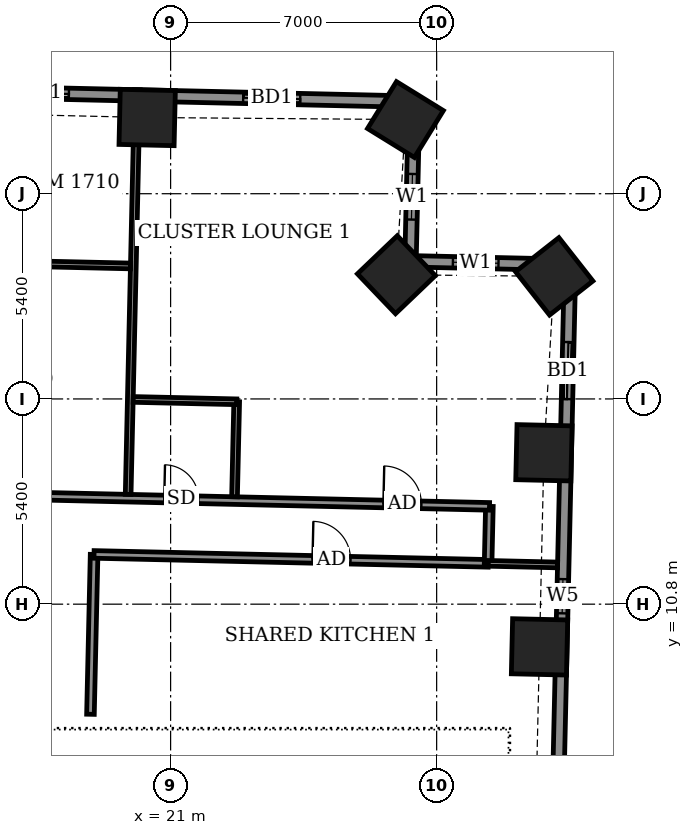
"""IFC4 building model, lengths in metres.
Left out: names, types, materials, properties, quantities, classifications, styles, units other than length and angle.
Written with IfcOpenShell. Run it as: python <this file> out.ifc"""

import sys

from ifc_helpers import new_model, si_unit, direction, frame, frame_2d, origin, origin_2d, place, context, subcontext, project, spatial, rectangle, extrude, element, fill, save


model = new_model("IFC4")
c1 = context("Model", 3, precision=1e-05, world=origin(), true_north=direction((0.0, 1.0)))
c2 = subcontext(c1, "Body", "Model", "MODEL_VIEW")
j1 = project(units=[si_unit("LENGTHUNIT", "METRE"), si_unit("PLANEANGLEUNIT", "RADIAN")], contexts=[c1])
p1 = place(None, origin())
s1 = spatial("IfcSite", under=j1, at=p1, CompositionType="ELEMENT")
p2 = place(p1, origin())
s2 = spatial("IfcBuilding", under=s1, at=p2, CompositionType="ELEMENT")
p3 = place(p2, frame((0.0, 0.0, 71.1)))
s3 = spatial("IfcBuildingStorey", under=s2, at=p3, CompositionType="ELEMENT", Elevation=71.1)
for number, where, z_axis, x_axis in (
    (1, (30.707, 9.677, -0.55), (0.0, 0.0, 1.0), (0.023, 1.0, 0.0)),
    (2, (30.823, 14.783, -0.55), (0.0, 0.0, 1.0), (0.023, 1.0, 0.0)),
    (3, (31.094, 19.425, -0.55), (0.0, 0.0, 1.0), (-0.617, 0.787, 0.0)),
    (4, (26.941, 19.468, -0.55), (0.0, 0.0, 1.0), (-0.691, 0.723, 0.0)),
    (5, (27.179, 23.551, -0.55), (0.0, 0.0, 1.0), (-0.851, 0.525, 0.0)),
    (6, (20.384, 23.605, -0.55), (0.0, 0.0, 1.0), (-1.0, 0.023, 0.0)),
):
    element("IfcColumn", number, at=place(p3, frame(where, z_axis=z_axis, x_axis=x_axis)), inside=s3, PredefinedType="COLUMN", context=c2, shape_type="SweptSolid", body=[
        extrude(rectangle(XDim=1.45, YDim=1.45, at=origin_2d()), origin(), (0.0, 0.0, 1.0), 3.6),
    ])
p4 = place(p3, frame((31.165, 4.502, 0.0), z_axis=(0.0, 0.0, 1.0), x_axis=(0.022716307128, 0.999741951401, 0.0)))
e7 = element("IfcWall", 7, at=p4, inside=s3, PredefinedType="SOLIDWALL", context=c2, shape_type="SweptSolid", body=[
    extrude(rectangle(XDim=15.229, YDim=0.3, at=frame_2d((7.615, 0.0))), origin(), (0.0, 0.0, 1.0), 3.05),
])
p5 = place(p4, frame((6.059, 0.0, 0.9)))
e8 = element("IfcOpeningElement", 8, at=p5, cuts=e7, PredefinedType="OPENING", context=c2, shape_type="SweptSolid", body=[
    extrude(rectangle(XDim=0.9, YDim=1.5, at=frame_2d((0.45, 0.75))), frame((0.0, 0.16, 0.0), z_axis=(0.0, -1.0, 0.0), x_axis=(1.0, 0.0, 0.0)), (0.0, 0.0, 1.0), 0.32),
])
p6 = place(p4, frame((11.697, 0.0, 0.0)))
e9 = element("IfcOpeningElement", 9, at=p6, cuts=e7, PredefinedType="OPENING", context=c2, shape_type="SweptSolid", body=[
    extrude(rectangle(XDim=1.5, YDim=2.4, at=frame_2d((0.75, 1.2))), frame((0.0, 0.16, 0.0), z_axis=(0.0, -1.0, 0.0), x_axis=(1.0, 0.0, 0.0)), (0.0, 0.0, 1.0), 0.32),
])
p7 = place(p3, frame((31.511, 19.727, 0.0), z_axis=(0.0, 0.0, 1.0), x_axis=(-0.999744320311, 0.022611811187, 0.0)))
e10 = element("IfcWall", 10, at=p7, inside=s3, PredefinedType="SOLIDWALL", context=c2, shape_type="SweptSolid", body=[
    extrude(rectangle(XDim=4.2, YDim=0.3, at=frame_2d((2.1, 0.0))), origin(), (0.0, 0.0, 1.0), 2.55),
])
p8 = place(p7, frame((1.884, 0.0, 0.9)))
e11 = element("IfcOpeningElement", 11, at=p8, cuts=e10, PredefinedType="OPENING", context=c2, shape_type="SweptSolid", body=[
    extrude(rectangle(XDim=1.2, YDim=1.5, at=frame_2d((0.6, 0.75))), frame((0.0, 0.16, 0.0), z_axis=(0.0, -1.0, 0.0), x_axis=(1.0, 0.0, 0.0)), (0.0, 0.0, 1.0), 0.32),
])
p9 = place(p3, frame((27.312, 19.822, 0.0), z_axis=(0.0, 0.0, 1.0), x_axis=(0.022611811187, 0.999744320311, 0.0)))
e12 = element("IfcWall", 12, at=p9, inside=s3, PredefinedType="SOLIDWALL", context=c2, shape_type="SweptSolid", body=[
    extrude(rectangle(XDim=4.2, YDim=0.3, at=frame_2d((2.1, 0.0))), origin(), (0.0, 0.0, 1.0), 2.55),
])
p10 = place(p9, frame((1.098, 0.0, 0.9)))
e13 = element("IfcOpeningElement", 13, at=p10, cuts=e12, PredefinedType="OPENING", context=c2, shape_type="SweptSolid", body=[
    extrude(rectangle(XDim=1.2, YDim=1.5, at=frame_2d((0.6, 0.75))), frame((0.0, 0.16, 0.0), z_axis=(0.0, -1.0, 0.0), x_axis=(1.0, 0.0, 0.0)), (0.0, 0.0, 1.0), 0.32),
])
p11 = place(p3, frame((27.407, 24.021, 0.0), z_axis=(0.0, 0.0, 1.0), x_axis=(-0.99974239923, 0.022696589664, 0.0)))
e14 = element("IfcWall", 14, at=p11, inside=s3, PredefinedType="SOLIDWALL", context=c2, shape_type="SweptSolid", body=[
    extrude(rectangle(XDim=49.836, YDim=0.3, at=frame_2d((24.918, 0.0))), origin(), (0.0, 0.0, 1.0), 3.05),
])
p12 = place(p11, frame((2.998, 0.0, 0.0)))
e15 = element("IfcOpeningElement", 15, at=p12, cuts=e14, PredefinedType="OPENING", context=c2, shape_type="SweptSolid", body=[
    extrude(rectangle(XDim=1.5, YDim=2.4, at=frame_2d((0.75, 1.2))), frame((0.0, 0.16, 0.0), z_axis=(0.0, -1.0, 0.0), x_axis=(1.0, 0.0, 0.0)), (0.0, 0.0, 1.0), 0.32),
])
p13 = place(p11, frame((9.086, 0.0, 0.0)))
e16 = element("IfcOpeningElement", 16, at=p13, cuts=e14, PredefinedType="OPENING", context=c2, shape_type="SweptSolid", body=[
    extrude(rectangle(XDim=1.5, YDim=2.4, at=frame_2d((0.75, 1.2))), frame((0.0, 0.16, 0.0), z_axis=(0.0, -1.0, 0.0), x_axis=(1.0, 0.0, 0.0)), (0.0, 0.0, 1.0), 0.32),
])
p14 = place(p11, frame((15.017, 0.0, 0.0)))
e17 = element("IfcOpeningElement", 17, at=p14, cuts=e14, PredefinedType="OPENING", context=c2, shape_type="SweptSolid", body=[
    extrude(rectangle(XDim=1.5, YDim=2.4, at=frame_2d((0.75, 1.2))), frame((0.0, 0.16, 0.0), z_axis=(0.0, -1.0, 0.0), x_axis=(1.0, 0.0, 0.0)), (0.0, 0.0, 1.0), 0.32),
])
p15 = place(p11, frame((18.124, 0.0, 0.0)))
e18 = element("IfcOpeningElement", 18, at=p15, cuts=e14, PredefinedType="OPENING", context=c2, shape_type="SweptSolid", body=[
    extrude(rectangle(XDim=1.5, YDim=2.4, at=frame_2d((0.75, 1.2))), frame((0.0, 0.16, 0.0), z_axis=(0.0, -1.0, 0.0), x_axis=(1.0, 0.0, 0.0)), (0.0, 0.0, 1.0), 0.32),
])
p16 = place(p11, frame((23.149, 0.0, 0.0)))
e19 = element("IfcOpeningElement", 19, at=p16, cuts=e14, PredefinedType="OPENING", context=c2, shape_type="SweptSolid", body=[
    extrude(rectangle(XDim=1.5, YDim=2.4, at=frame_2d((0.75, 1.2))), frame((0.0, 0.16, 0.0), z_axis=(0.0, -1.0, 0.0), x_axis=(1.0, 0.0, 0.0)), (0.0, 0.0, 1.0), 0.32),
])
p17 = place(p11, frame((26.405, 0.0, 0.0)))
e20 = element("IfcOpeningElement", 20, at=p17, cuts=e14, PredefinedType="OPENING", context=c2, shape_type="SweptSolid", body=[
    extrude(rectangle(XDim=1.2, YDim=2.4, at=frame_2d((0.6, 1.2))), frame((0.0, 0.16, 0.0), z_axis=(0.0, -1.0, 0.0), x_axis=(1.0, 0.0, 0.0)), (0.0, 0.0, 1.0), 0.32),
])
p18 = place(p11, frame((31.986, 0.0, 0.0)))
e21 = element("IfcOpeningElement", 21, at=p18, cuts=e14, PredefinedType="OPENING", context=c2, shape_type="SweptSolid", body=[
    extrude(rectangle(XDim=1.5, YDim=2.4, at=frame_2d((0.75, 1.2))), frame((0.0, 0.16, 0.0), z_axis=(0.0, -1.0, 0.0), x_axis=(1.0, 0.0, 0.0)), (0.0, 0.0, 1.0), 0.32),
])
p19 = place(p11, frame((37.211, 0.0, 0.0)))
e22 = element("IfcOpeningElement", 22, at=p19, cuts=e14, PredefinedType="OPENING", context=c2, shape_type="SweptSolid", body=[
    extrude(rectangle(XDim=1.5, YDim=2.4, at=frame_2d((0.75, 1.2))), frame((0.0, 0.16, 0.0), z_axis=(0.0, -1.0, 0.0), x_axis=(1.0, 0.0, 0.0)), (0.0, 0.0, 1.0), 0.32),
])
p20 = place(p11, frame((40.317, 0.0, 0.0)))
e23 = element("IfcOpeningElement", 23, at=p20, cuts=e14, PredefinedType="OPENING", context=c2, shape_type="SweptSolid", body=[
    extrude(rectangle(XDim=1.5, YDim=2.4, at=frame_2d((0.75, 1.2))), frame((0.0, 0.16, 0.0), z_axis=(0.0, -1.0, 0.0), x_axis=(1.0, 0.0, 0.0)), (0.0, 0.0, 1.0), 0.32),
])
p21 = place(p11, frame((45.431, 0.0, 0.9)))
e24 = element("IfcOpeningElement", 24, at=p21, cuts=e14, PredefinedType="OPENING", context=c2, shape_type="SweptSolid", body=[
    extrude(rectangle(XDim=2.4, YDim=1.5, at=frame_2d((1.2, 0.75))), frame((0.0, 0.16, 0.0), z_axis=(0.0, -1.0, 0.0), x_axis=(1.0, 0.0, 0.0)), (0.0, 0.0, 1.0), 0.32),
])
p22 = place(p3, frame((18.891, 7.903, 0.0), z_axis=(0.0, 0.0, 1.0), x_axis=(0.022807092041, 0.999739884446, 0.0)))
e25 = element("IfcWall", 25, at=p22, inside=s3, PredefinedType="PARTITIONING", context=c2, shape_type="SweptSolid", body=[
    extrude(rectangle(XDim=4.207, YDim=0.2, at=frame_2d((2.104, 0.0))), origin(), (0.0, 0.0, 1.0), 3.05),
])
p23 = place(p3, frame((18.985, 12.109, 0.0), z_axis=(0.0, 0.0, 1.0), x_axis=(0.999743715221, -0.022638548456, 0.0)))
e26 = element("IfcWall", 26, at=p23, inside=s3, PredefinedType="PARTITIONING", context=c2, shape_type="SweptSolid", body=[
    extrude(rectangle(XDim=10.375, YDim=0.2, at=frame_2d((5.187, 0.0))), origin(), (0.0, 0.0, 1.0), 3.05),
])
p24 = place(p23, frame((5.75, 0.0, 0.0)))
e27 = element("IfcOpeningElement", 27, at=p24, cuts=e26, PredefinedType="OPENING", context=c2, shape_type="SweptSolid", body=[
    extrude(rectangle(XDim=1.0, YDim=2.1, at=frame_2d((0.5, 1.05))), frame((0.0, 0.11, 0.0), z_axis=(0.0, -1.0, 0.0), x_axis=(1.0, 0.0, 0.0)), (0.0, 0.0, 1.0), 0.22),
])
p25 = place(p3, frame((29.354, 11.874, 0.0), z_axis=(0.0, 0.0, 1.0), x_axis=(0.022632637625, 0.99974384905, 0.0)))
e28 = element("IfcWall", 28, at=p25, inside=s3, PredefinedType="PARTITIONING", context=c2, shape_type="SweptSolid", body=[
    extrude(rectangle(XDim=1.5, YDim=0.2, at=frame_2d((0.75, 0.0))), origin(), (0.0, 0.0, 1.0), 3.05),
])
p26 = place(p3, frame((29.357, 11.874, 0.0), z_axis=(0.0, 0.0, 1.0), x_axis=(0.999735374258, -0.023003944398, 0.0)))
e29 = element("IfcWall", 29, at=p26, inside=s3, PredefinedType="PARTITIONING", context=c2, shape_type="SweptSolid", body=[
    extrude(rectangle(XDim=1.825, YDim=0.15, at=frame_2d((0.913, 0.0))), origin(), (0.0, 0.0, 1.0), 2.55),
])
p27 = place(p3, frame((-25.481, 14.619, 0.0), z_axis=(0.0, 0.0, 1.0), x_axis=(0.999742349682, -0.022698772048, 0.0)))
e30 = element("IfcWall", 30, at=p27, inside=s3, PredefinedType="PARTITIONING", context=c2, shape_type="SweptSolid", body=[
    extrude(rectangle(XDim=54.886, YDim=0.2, at=frame_2d((27.443, 0.0))), origin(), (0.0, 0.0, 1.0), 3.05),
])
p28 = place(p27, frame((52.093, 0.0, 0.0)))
e31 = element("IfcOpeningElement", 31, at=p28, cuts=e30, PredefinedType="OPENING", context=c2, shape_type="SweptSolid", body=[
    extrude(rectangle(XDim=1.0, YDim=2.1, at=frame_2d((0.5, 1.05))), frame((0.0, 0.11, 0.0), z_axis=(0.0, -1.0, 0.0), x_axis=(1.0, 0.0, 0.0)), (0.0, 0.0, 1.0), 0.22),
])
p29 = place(p27, frame((46.325, 0.0, 0.0)))
e32 = element("IfcOpeningElement", 32, at=p29, cuts=e30, PredefinedType="OPENING", context=c2, shape_type="SweptSolid", body=[
    extrude(rectangle(XDim=0.9, YDim=2.1, at=frame_2d((0.45, 1.05))), frame((0.0, 0.11, 0.0), z_axis=(0.0, -1.0, 0.0), x_axis=(1.0, 0.0, 0.0)), (0.0, 0.0, 1.0), 0.22),
])
p30 = place(p27, frame((41.275, 0.0, 0.0)))
e33 = element("IfcOpeningElement", 33, at=p30, cuts=e30, PredefinedType="OPENING", context=c2, shape_type="SweptSolid", body=[
    extrude(rectangle(XDim=0.9, YDim=2.1, at=frame_2d((0.45, 1.05))), frame((0.0, 0.11, 0.0), z_axis=(0.0, -1.0, 0.0), x_axis=(1.0, 0.0, 0.0)), (0.0, 0.0, 1.0), 0.22),
])
p31 = place(p27, frame((38.875, 0.0, 0.0)))
e34 = element("IfcOpeningElement", 34, at=p31, cuts=e30, PredefinedType="OPENING", context=c2, shape_type="SweptSolid", body=[
    extrude(rectangle(XDim=0.9, YDim=2.1, at=frame_2d((0.45, 1.05))), frame((0.0, 0.11, 0.0), z_axis=(0.0, -1.0, 0.0), x_axis=(1.0, 0.0, 0.0)), (0.0, 0.0, 1.0), 0.22),
])
p32 = place(p27, frame((31.95, 0.0, 0.0)))
e35 = element("IfcOpeningElement", 35, at=p32, cuts=e30, PredefinedType="OPENING", context=c2, shape_type="SweptSolid", body=[
    extrude(rectangle(XDim=0.9, YDim=2.1, at=frame_2d((0.45, 1.05))), frame((0.0, 0.11, 0.0), z_axis=(0.0, -1.0, 0.0), x_axis=(1.0, 0.0, 0.0)), (0.0, 0.0, 1.0), 0.22),
])
p33 = place(p27, frame((29.8, 0.0, 0.0)))
e36 = element("IfcOpeningElement", 36, at=p33, cuts=e30, PredefinedType="OPENING", context=c2, shape_type="SweptSolid", body=[
    extrude(rectangle(XDim=0.9, YDim=2.1, at=frame_2d((0.45, 1.05))), frame((0.0, 0.11, 0.0), z_axis=(0.0, -1.0, 0.0), x_axis=(1.0, 0.0, 0.0)), (0.0, 0.0, 1.0), 0.22),
])
p34 = place(p27, frame((22.875, 0.0, 0.0)))
e37 = element("IfcOpeningElement", 37, at=p34, cuts=e30, PredefinedType="OPENING", context=c2, shape_type="SweptSolid", body=[
    extrude(rectangle(XDim=0.9, YDim=2.1, at=frame_2d((0.45, 1.05))), frame((0.0, 0.11, 0.0), z_axis=(0.0, -1.0, 0.0), x_axis=(1.0, 0.0, 0.0)), (0.0, 0.0, 1.0), 0.22),
])
p35 = place(p27, frame((20.675, 0.0, 0.0)))
e38 = element("IfcOpeningElement", 38, at=p35, cuts=e30, PredefinedType="OPENING", context=c2, shape_type="SweptSolid", body=[
    extrude(rectangle(XDim=0.9, YDim=2.1, at=frame_2d((0.45, 1.05))), frame((0.0, 0.11, 0.0), z_axis=(0.0, -1.0, 0.0), x_axis=(1.0, 0.0, 0.0)), (0.0, 0.0, 1.0), 0.22),
])
p36 = place(p27, frame((13.525, 0.0, 0.0)))
e39 = element("IfcOpeningElement", 39, at=p36, cuts=e30, PredefinedType="OPENING", context=c2, shape_type="SweptSolid", body=[
    extrude(rectangle(XDim=0.9, YDim=2.1, at=frame_2d((0.45, 1.05))), frame((0.0, 0.11, 0.0), z_axis=(0.0, -1.0, 0.0), x_axis=(1.0, 0.0, 0.0)), (0.0, 0.0, 1.0), 0.22),
])
p37 = place(p27, frame((11.275, 0.0, 0.0)))
e40 = element("IfcOpeningElement", 40, at=p37, cuts=e30, PredefinedType="OPENING", context=c2, shape_type="SweptSolid", body=[
    extrude(rectangle(XDim=0.9, YDim=2.1, at=frame_2d((0.45, 1.05))), frame((0.0, 0.11, 0.0), z_axis=(0.0, -1.0, 0.0), x_axis=(1.0, 0.0, 0.0)), (0.0, 0.0, 1.0), 0.22),
])
p38 = place(p27, frame((3.079, 0.0, 0.0)))
e41 = element("IfcOpeningElement", 41, at=p38, cuts=e30, PredefinedType="OPENING", context=c2, shape_type="SweptSolid", body=[
    extrude(rectangle(XDim=1.0, YDim=2.1, at=frame_2d((0.5, 1.05))), frame((0.0, 0.11, 0.0), z_axis=(0.0, -1.0, 0.0), x_axis=(1.0, 0.0, 0.0)), (0.0, 0.0, 1.0), 0.22),
])
p39 = place(p3, frame((19.883, 13.689, 0.0), z_axis=(0.0, 0.0, 1.0), x_axis=(0.022626629517, 0.999743985047, 0.0)))
e42 = element("IfcWall", 42, at=p39, inside=s3, PredefinedType="PARTITIONING", context=c2, shape_type="SweptSolid", body=[
    extrude(rectangle(XDim=10.65, YDim=0.15, at=frame_2d((5.325, 0.0))), origin(), (0.0, 0.0, 1.0), 3.05),
])
p40 = place(p3, frame((22.682, 13.626, 0.0), z_axis=(0.0, 0.0, 1.0), x_axis=(0.022854521249, 0.999738801317, 0.0)))
e43 = element("IfcWall", 43, at=p40, inside=s3, PredefinedType="PARTITIONING", context=c2, shape_type="SweptSolid", body=[
    extrude(rectangle(XDim=2.5, YDim=0.15, at=frame_2d((1.25, 0.0))), origin(), (0.0, 0.0, 1.0), 3.05),
])
p41 = place(p3, frame((20.016, 16.187, 0.0), z_axis=(0.0, 0.0, 1.0), x_axis=(0.99974114142, -0.022751926344, 0.0)))
e44 = element("IfcWall", 44, at=p41, inside=s3, PredefinedType="PARTITIONING", context=c2, shape_type="SweptSolid", body=[
    extrude(rectangle(XDim=2.726, YDim=0.15, at=frame_2d((1.363, 0.0))), origin(), (0.0, 0.0, 1.0), 3.05),
])
p42 = place(p3, frame((17.622, 19.752, 0.0), z_axis=(0.0, 0.0, 1.0), x_axis=(0.999740260747, -0.02279059109, 0.0)))
e45 = element("IfcWall", 45, at=p42, inside=s3, PredefinedType="PARTITIONING", context=c2, shape_type="SweptSolid", body=[
    extrude(rectangle(XDim=2.324, YDim=0.15, at=frame_2d((1.162, 0.0))), origin(), (0.0, 0.0, 1.0), 3.05),
])
p43 = place(p5, origin())
e46 = element("IfcWindow", 46, at=p43, inside=s3, PartitioningType="SINGLE_PANEL", PredefinedType="WINDOW", context=c2, shape_type="SweptSolid", body=[
    extrude(rectangle(XDim=0.9, YDim=1.5, at=frame_2d((0.45, 0.75))), frame((0.0, 0.03, 0.0), z_axis=(0.0, -1.0, 0.0), x_axis=(1.0, 0.0, 0.0)), (0.0, 0.0, 1.0), 0.06),
])
fill(e8, e46)
p44 = place(p6, origin())
e47 = element("IfcDoor", 47, at=p44, inside=s3, OperationType="SLIDING_TO_LEFT", PredefinedType="DOOR", context=c2, shape_type="SweptSolid", body=[
    extrude(rectangle(XDim=1.5, YDim=2.4, at=frame_2d((0.75, 1.2))), frame((0.0, 0.025, 0.0), z_axis=(0.0, -1.0, 0.0), x_axis=(1.0, 0.0, 0.0)), (0.0, 0.0, 1.0), 0.05),
])
fill(e9, e47)
p45 = place(p8, origin())
e48 = element("IfcWindow", 48, at=p45, inside=s3, PartitioningType="SINGLE_PANEL", PredefinedType="WINDOW", context=c2, shape_type="SweptSolid", body=[
    extrude(rectangle(XDim=1.2, YDim=1.5, at=frame_2d((0.6, 0.75))), frame((0.0, 0.03, 0.0), z_axis=(0.0, -1.0, 0.0), x_axis=(1.0, 0.0, 0.0)), (0.0, 0.0, 1.0), 0.06),
])
fill(e11, e48)
p46 = place(p10, origin())
e49 = element("IfcWindow", 49, at=p46, inside=s3, PartitioningType="SINGLE_PANEL", PredefinedType="WINDOW", context=c2, shape_type="SweptSolid", body=[
    extrude(rectangle(XDim=1.2, YDim=1.5, at=frame_2d((0.6, 0.75))), frame((0.0, 0.03, 0.0), z_axis=(0.0, -1.0, 0.0), x_axis=(1.0, 0.0, 0.0)), (0.0, 0.0, 1.0), 0.06),
])
fill(e13, e49)
p47 = place(p12, origin())
e50 = element("IfcDoor", 50, at=p47, inside=s3, OperationType="SLIDING_TO_LEFT", PredefinedType="DOOR", context=c2, shape_type="SweptSolid", body=[
    extrude(rectangle(XDim=1.5, YDim=2.4, at=frame_2d((0.75, 1.2))), frame((0.0, 0.025, 0.0), z_axis=(0.0, -1.0, 0.0), x_axis=(1.0, 0.0, 0.0)), (0.0, 0.0, 1.0), 0.05),
])
fill(e15, e50)
p48 = place(p13, origin())
e51 = element("IfcDoor", 51, at=p48, inside=s3, OperationType="SLIDING_TO_LEFT", PredefinedType="DOOR", context=c2, shape_type="SweptSolid", body=[
    extrude(rectangle(XDim=1.5, YDim=2.4, at=frame_2d((0.75, 1.2))), frame((0.0, 0.025, 0.0), z_axis=(0.0, -1.0, 0.0), x_axis=(1.0, 0.0, 0.0)), (0.0, 0.0, 1.0), 0.05),
])
fill(e16, e51)
p49 = place(p24, origin())
e52 = element("IfcDoor", 52, at=p49, inside=s3, OperationType="SINGLE_SWING_RIGHT", PredefinedType="DOOR", context=c2, shape_type="SweptSolid", body=[
    extrude(rectangle(XDim=1.0, YDim=2.1, at=frame_2d((0.5, 1.05))), frame((0.0, 0.025, 0.0), z_axis=(0.0, -1.0, 0.0), x_axis=(1.0, 0.0, 0.0)), (0.0, 0.0, 1.0), 0.05),
])
fill(e27, e52)
p50 = place(p28, origin())
e53 = element("IfcDoor", 53, at=p50, inside=s3, OperationType="SINGLE_SWING_LEFT", PredefinedType="DOOR", context=c2, shape_type="SweptSolid", body=[
    extrude(rectangle(XDim=1.0, YDim=2.1, at=frame_2d((0.5, 1.05))), frame((0.0, 0.025, 0.0), z_axis=(0.0, -1.0, 0.0), x_axis=(1.0, 0.0, 0.0)), (0.0, 0.0, 1.0), 0.05),
])
fill(e31, e53)
p51 = place(p29, origin())
e54 = element("IfcDoor", 54, at=p51, inside=s3, OperationType="SINGLE_SWING_RIGHT", PredefinedType="DOOR", context=c2, shape_type="SweptSolid", body=[
    extrude(rectangle(XDim=0.9, YDim=2.1, at=frame_2d((0.45, 1.05))), frame((0.0, 0.025, 0.0), z_axis=(0.0, -1.0, 0.0), x_axis=(1.0, 0.0, 0.0)), (0.0, 0.0, 1.0), 0.05),
])
fill(e32, e54)
save(model, sys.argv[1])
